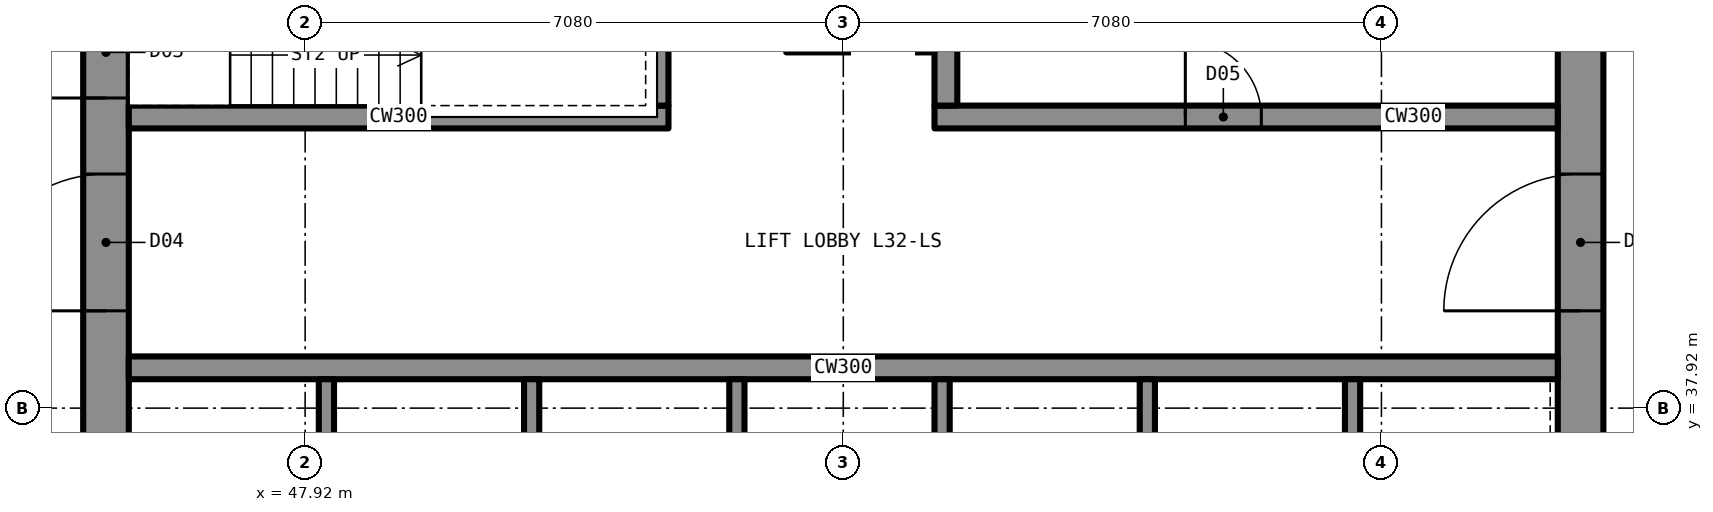
"""IFC4 building model, lengths in metres.
Left out: names, types, materials, properties, quantities, classifications, styles, units other than length and angle.
Written with IfcOpenShell. Run it as: python <this file> out.ifc"""

import sys

from ifc_helpers import new_model, si_unit, direction, frame, frame_2d, origin, place, context, subcontext, project, spatial, rectangle, extrude, element, fill, save


model = new_model("IFC4")
c1 = context("Model", 3, precision=1e-05, world=origin(), true_north=direction((0.0, 1.0)))
c2 = subcontext(c1, "Body", "Model", "MODEL_VIEW")
j1 = project(units=[si_unit("LENGTHUNIT", "METRE"), si_unit("PLANEANGLEUNIT", "RADIAN")], contexts=[c1])
p1 = place(None, origin())
s1 = spatial("IfcSite", under=j1, at=p1, CompositionType="ELEMENT")
p2 = place(p1, origin())
s2 = spatial("IfcBuilding", under=s1, at=p2, CompositionType="ELEMENT")
p3 = place(p2, frame((0.0, 0.0, 114.4)))
s3 = spatial("IfcBuildingStorey", under=s2, at=p3, CompositionType="ELEMENT", Elevation=114.4)
p4 = place(p3, frame((64.7, 35.6, 0.0), z_axis=(0.0, 0.0, 1.0), x_axis=(0.0, 1.0, 0.0)))
e1 = element("IfcWall", 1, at=p4, inside=s3, PredefinedType="SHEAR", context=c2, shape_type="SweptSolid", body=[
    extrude(rectangle(XDim=18.8, YDim=0.6, at=frame_2d((9.4, 0.0))), origin(), (0.0, 0.0, 1.0), 3.5),
])
p5 = place(p4, frame((13.4, 0.0, 0.0)))
e2 = element("IfcOpeningElement", 2, at=p5, cuts=e1, PredefinedType="OPENING", context=c2, shape_type="SweptSolid", body=[
    extrude(rectangle(XDim=1.8, YDim=2.2, at=frame_2d((0.9, 1.1))), frame((0.0, 0.31, 0.0), z_axis=(0.0, -1.0, 0.0), x_axis=(1.0, 0.0, 0.0)), (0.0, 0.0, 1.0), 0.62),
])
p6 = place(p4, frame((3.6, 0.0, 0.0)))
e3 = element("IfcOpeningElement", 3, at=p6, cuts=e1, PredefinedType="OPENING", context=c2, shape_type="SweptSolid", body=[
    extrude(rectangle(XDim=1.8, YDim=2.2, at=frame_2d((0.9, 1.1))), frame((0.0, 0.31, 0.0), z_axis=(0.0, -1.0, 0.0), x_axis=(1.0, 0.0, 0.0)), (0.0, 0.0, 1.0), 0.62),
])
p7 = place(p3, frame((45.3, 35.6, 0.0), z_axis=(0.0, 0.0, 1.0), x_axis=(0.0, 1.0, 0.0)))
e4 = element("IfcWall", 4, at=p7, inside=s3, PredefinedType="SHEAR", context=c2, shape_type="SweptSolid", body=[
    extrude(rectangle(XDim=18.8, YDim=0.6, at=frame_2d((9.4, 0.0))), origin(), (0.0, 0.0, 1.0), 3.5),
])
p8 = place(p7, frame((13.4, 0.0, 0.0)))
e5 = element("IfcOpeningElement", 5, at=p8, cuts=e4, PredefinedType="OPENING", context=c2, shape_type="SweptSolid", body=[
    extrude(rectangle(XDim=1.8, YDim=2.2, at=frame_2d((0.9, 1.1))), frame((0.0, 0.31, 0.0), z_axis=(0.0, -1.0, 0.0), x_axis=(1.0, 0.0, 0.0)), (0.0, 0.0, 1.0), 0.62),
])
p9 = place(p7, frame((3.6, 0.0, 0.0)))
e6 = element("IfcOpeningElement", 6, at=p9, cuts=e4, PredefinedType="OPENING", context=c2, shape_type="SweptSolid", body=[
    extrude(rectangle(XDim=1.8, YDim=2.2, at=frame_2d((0.9, 1.1))), frame((0.0, 0.31, 0.0), z_axis=(0.0, -1.0, 0.0), x_axis=(1.0, 0.0, 0.0)), (0.0, 0.0, 1.0), 0.62),
])
p10 = place(p7, frame((6.4, 0.0, 0.0)))
e7 = element("IfcOpeningElement", 7, at=p10, cuts=e4, PredefinedType="OPENING", context=c2, shape_type="SweptSolid", body=[
    extrude(rectangle(XDim=1.2, YDim=2.2, at=frame_2d((0.6, 1.1))), frame((0.0, 0.31, 0.0), z_axis=(0.0, -1.0, 0.0), x_axis=(1.0, 0.0, 0.0)), (0.0, 0.0, 1.0), 0.62),
])
p11 = place(p3, frame((45.6, 38.45, 0.0), z_axis=(0.0, 0.0, 1.0), x_axis=(1.0, 0.0, 0.0)))
e8 = element("IfcWall", 8, at=p11, inside=s3, PredefinedType="SHEAR", context=c2, shape_type="SweptSolid", body=[
    extrude(rectangle(XDim=18.8, YDim=0.3, at=frame_2d((9.4, 0.0))), origin(), (0.0, 0.0, 1.0), 3.5),
])
p12 = place(p3, frame((45.6, 41.75, 0.0), z_axis=(0.0, 0.0, 1.0), x_axis=(1.0, 0.0, 0.0)))
e9 = element("IfcWall", 9, at=p12, inside=s3, PredefinedType="SHEAR", context=c2, shape_type="SweptSolid", body=[
    extrude(rectangle(XDim=7.1, YDim=0.3, at=frame_2d((3.55, 0.0))), origin(), (0.0, 0.0, 1.0), 3.5),
])
p13 = place(p3, frame((56.2, 41.75, 0.0), z_axis=(0.0, 0.0, 1.0), x_axis=(1.0, 0.0, 0.0)))
e10 = element("IfcWall", 10, at=p13, inside=s3, PredefinedType="SHEAR", context=c2, shape_type="SweptSolid", body=[
    extrude(rectangle(XDim=8.2, YDim=0.3, at=frame_2d((4.1, 0.0))), origin(), (0.0, 0.0, 1.0), 3.5),
])
p14 = place(p13, frame((3.3, 0.0, 0.0)))
e11 = element("IfcOpeningElement", 11, at=p14, cuts=e10, PredefinedType="OPENING", context=c2, shape_type="SweptSolid", body=[
    extrude(rectangle(XDim=1.0, YDim=2.1, at=frame_2d((0.5, 1.05))), frame((0.0, 0.16, 0.0), z_axis=(0.0, -1.0, 0.0), x_axis=(1.0, 0.0, 0.0)), (0.0, 0.0, 1.0), 0.32),
])
p15 = place(p3, frame((52.55, 41.9, 0.0), z_axis=(0.0, 0.0, 1.0), x_axis=(0.0, 1.0, 0.0)))
e12 = element("IfcWall", 12, at=p15, inside=s3, PredefinedType="SHEAR", context=c2, shape_type="SweptSolid", body=[
    extrude(rectangle(XDim=6.2, YDim=0.3, at=frame_2d((3.1, 0.0))), origin(), (0.0, 0.0, 1.0), 3.5),
])
p16 = place(p15, frame((4.125, 0.0, 0.0)))
e13 = element("IfcOpeningElement", 13, at=p16, cuts=e12, PredefinedType="OPENING", context=c2, shape_type="SweptSolid", body=[
    extrude(rectangle(XDim=1.2, YDim=2.2, at=frame_2d((0.6, 1.1))), frame((0.0, 0.16, 0.0), z_axis=(0.0, -1.0, 0.0), x_axis=(1.0, 0.0, 0.0)), (0.0, 0.0, 1.0), 0.32),
])
p17 = place(p3, frame((56.35, 41.9, 0.0), z_axis=(0.0, 0.0, 1.0), x_axis=(0.0, 1.0, 0.0)))
e14 = element("IfcWall", 14, at=p17, inside=s3, PredefinedType="SHEAR", context=c2, shape_type="SweptSolid", body=[
    extrude(rectangle(XDim=9.5, YDim=0.3, at=frame_2d((4.75, 0.0))), origin(), (0.0, 0.0, 1.0), 3.5),
])
p18 = place(p17, frame((7.1, 0.0, 0.0)))
e15 = element("IfcOpeningElement", 15, at=p18, cuts=e14, PredefinedType="OPENING", context=c2, shape_type="SweptSolid", body=[
    extrude(rectangle(XDim=1.8, YDim=2.2, at=frame_2d((0.9, 1.1))), frame((0.0, 0.16, 0.0), z_axis=(0.0, -1.0, 0.0), x_axis=(1.0, 0.0, 0.0)), (0.0, 0.0, 1.0), 0.32),
])
p19 = place(p3, frame((54.35, 42.0, 0.0), z_axis=(0.0, 0.0, 1.0), x_axis=(0.0, 1.0, 0.0)))
e16 = element("IfcWall", 16, at=p19, inside=s3, PredefinedType="PARTITIONING", context=c2, shape_type="SweptSolid", body=[
    extrude(rectangle(XDim=1.7, YDim=0.2, at=frame_2d((0.85, 0.0))), origin(), (0.0, 0.0, 1.0), 3.33),
])
p20 = place(p19, frame((0.35, 0.0, 0.0)))
e17 = element("IfcOpeningElement", 17, at=p20, cuts=e16, PredefinedType="OPENING", context=c2, shape_type="SweptSolid", body=[
    extrude(rectangle(XDim=1.0, YDim=2.1, at=frame_2d((0.5, 1.05))), frame((0.0, 0.11, 0.0), z_axis=(0.0, -1.0, 0.0), x_axis=(1.0, 0.0, 0.0)), (0.0, 0.0, 1.0), 0.22),
])
p21 = place(p3, frame((54.25, 42.0, 0.0), z_axis=(0.0, 0.0, 1.0), x_axis=(1.0, 0.0, 0.0)))
e18 = element("IfcWall", 18, at=p21, inside=s3, PredefinedType="PARTITIONING", context=c2, shape_type="SweptSolid", body=[
    extrude(rectangle(XDim=1.95, YDim=0.2, at=frame_2d((0.975, 0.0))), origin(), (0.0, 0.0, 1.0), 3.33),
])
for number, where, z_axis, x_axis in (
    (19, (48.2, 35.6, 0.0), (0.0, 0.0, 1.0), (0.0, 1.0, 0.0)),
    (20, (50.9, 35.6, 0.0), (0.0, 0.0, 1.0), (0.0, 1.0, 0.0)),
    (21, (53.6, 35.6, 0.0), (0.0, 0.0, 1.0), (0.0, 1.0, 0.0)),
    (22, (56.3, 35.6, 0.0), (0.0, 0.0, 1.0), (0.0, 1.0, 0.0)),
    (23, (59.0, 35.6, 0.0), (0.0, 0.0, 1.0), (0.0, 1.0, 0.0)),
    (24, (61.7, 35.6, 0.0), (0.0, 0.0, 1.0), (0.0, 1.0, 0.0)),
):
    element("IfcWall", number, at=place(p3, frame(where, z_axis=z_axis, x_axis=x_axis)), inside=s3, PredefinedType="PARTITIONING", context=c2, shape_type="SweptSolid", body=[
        extrude(rectangle(XDim=2.7, YDim=0.2, at=frame_2d((1.35, 0.0))), origin(), (0.0, 0.0, 1.0), 3.33),
    ])
p22 = place(p20, origin())
e25 = element("IfcDoor", 25, at=p22, inside=s3, OperationType="SINGLE_SWING_LEFT", PredefinedType="DOOR", context=c2, shape_type="SweptSolid", body=[
    extrude(rectangle(XDim=1.0, YDim=2.1, at=frame_2d((0.5, 1.05))), frame((0.0, 0.025, 0.0), z_axis=(0.0, -1.0, 0.0), x_axis=(1.0, 0.0, 0.0)), (0.0, 0.0, 1.0), 0.05),
])
fill(e17, e25)
p23 = place(p9, origin())
e26 = element("IfcDoor", 26, at=p23, inside=s3, OperationType="DOUBLE_DOOR_SINGLE_SWING", PredefinedType="DOOR", context=c2, shape_type="SweptSolid", body=[
    extrude(rectangle(XDim=1.8, YDim=2.2, at=frame_2d((0.9, 1.1))), frame((0.0, 0.025, 0.0), z_axis=(0.0, -1.0, 0.0), x_axis=(1.0, 0.0, 0.0)), (0.0, 0.0, 1.0), 0.05),
])
fill(e6, e26)
p24 = place(p6, origin())
e27 = element("IfcDoor", 27, at=p24, inside=s3, OperationType="DOUBLE_DOOR_SINGLE_SWING", PredefinedType="DOOR", context=c2, shape_type="SweptSolid", body=[
    extrude(rectangle(XDim=1.8, YDim=2.2, at=frame_2d((0.9, 1.1))), frame((0.0, 0.025, 0.0), z_axis=(0.0, -1.0, 0.0), x_axis=(1.0, 0.0, 0.0)), (0.0, 0.0, 1.0), 0.05),
])
fill(e3, e27)
p25 = place(p10, origin())
e28 = element("IfcDoor", 28, at=p25, inside=s3, OperationType="SINGLE_SWING_LEFT", PredefinedType="DOOR", context=c2, shape_type="SweptSolid", body=[
    extrude(rectangle(XDim=1.2, YDim=2.2, at=frame_2d((0.6, 1.1))), frame((0.0, 0.025, 0.0), z_axis=(0.0, -1.0, 0.0), x_axis=(1.0, 0.0, 0.0)), (0.0, 0.0, 1.0), 0.05),
])
fill(e7, e28)
p26 = place(p14, origin())
e29 = element("IfcDoor", 29, at=p26, inside=s3, OperationType="SINGLE_SWING_LEFT", PredefinedType="DOOR", context=c2, shape_type="SweptSolid", body=[
    extrude(rectangle(XDim=1.0, YDim=2.1, at=frame_2d((0.5, 1.05))), frame((0.0, 0.025, 0.0), z_axis=(0.0, -1.0, 0.0), x_axis=(1.0, 0.0, 0.0)), (0.0, 0.0, 1.0), 0.05),
])
fill(e11, e29)
save(model, sys.argv[1])
